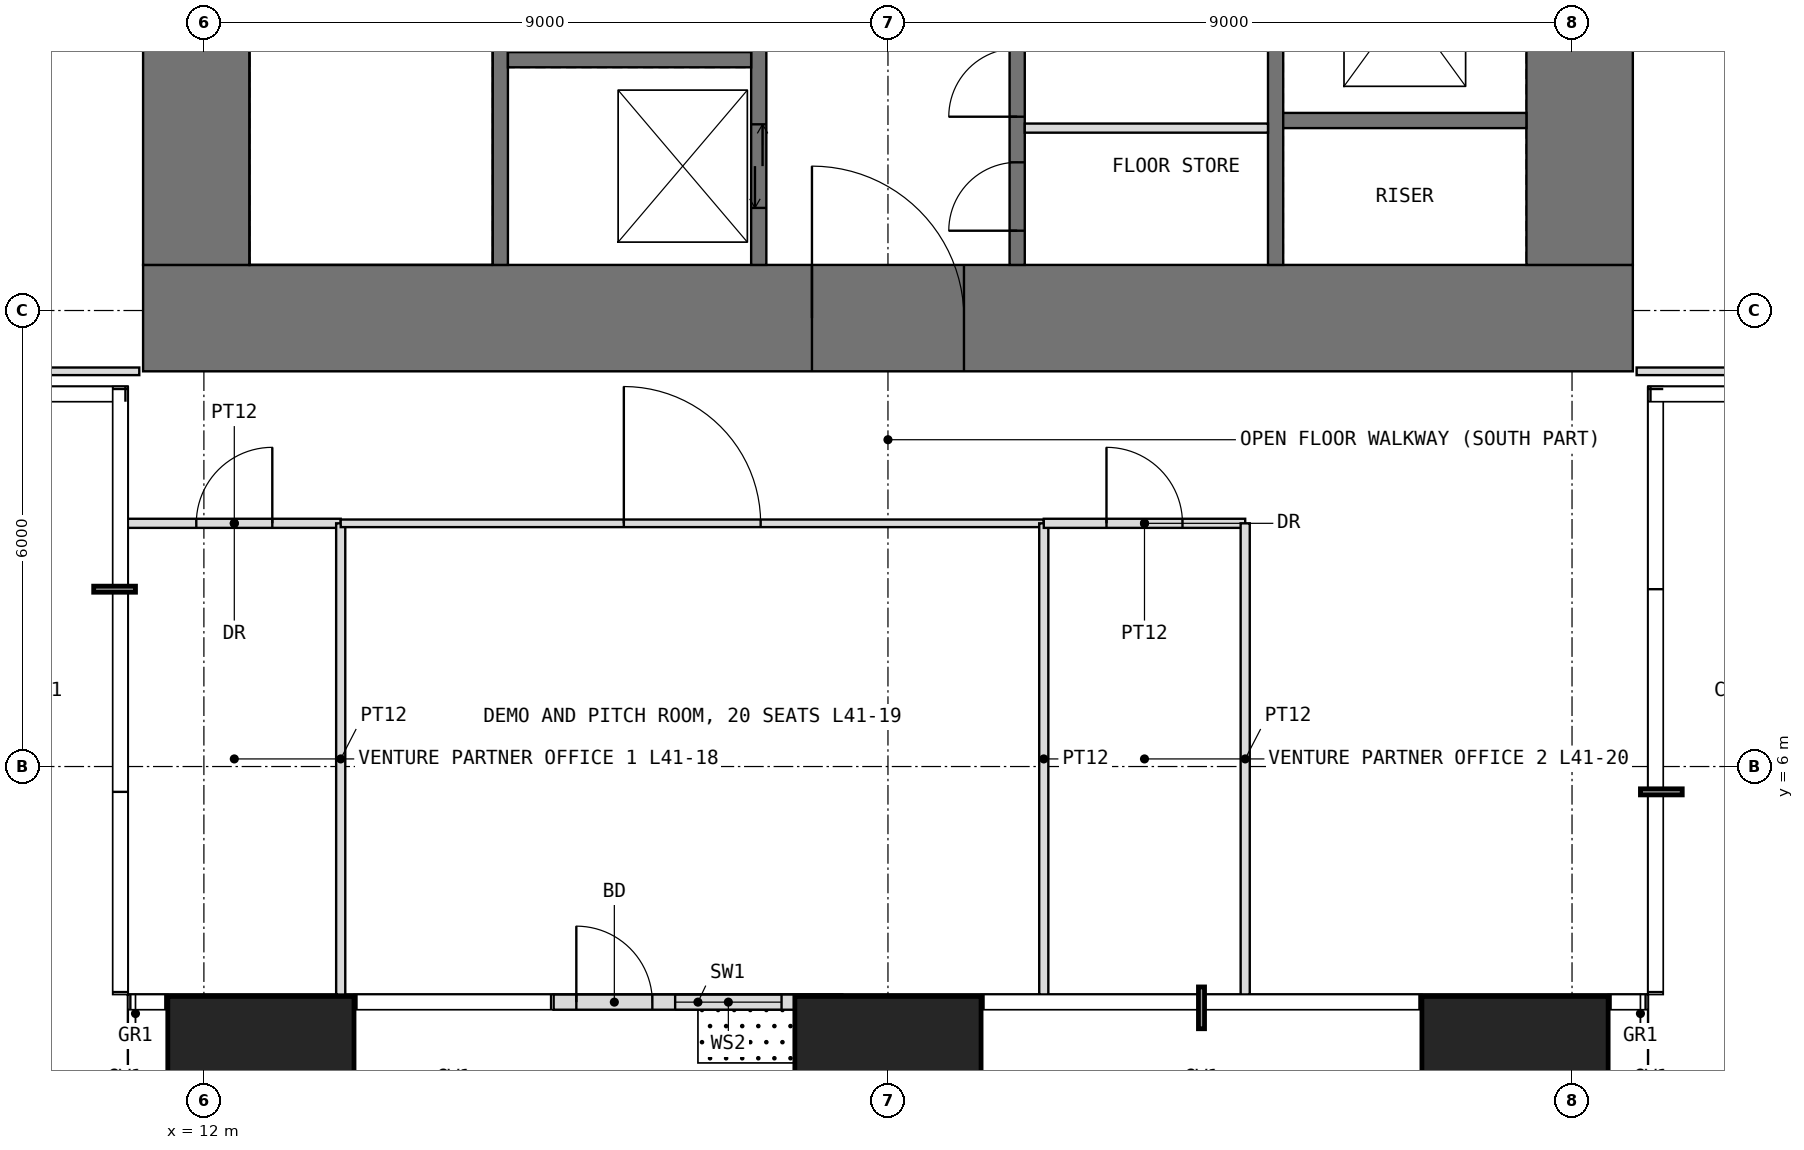
"""IFC4 building model, lengths in metres.
Left out: names, types, materials, properties, quantities, classifications, styles, units other than length and angle.
Written with IfcOpenShell. Run it as: python <this file> out.ifc"""

import sys

from ifc_helpers import new_model, si_unit, direction, frame, frame_2d, origin, origin_2d, place, context, subcontext, project, spatial, rectangle, extrude, element, fill, save


model = new_model("IFC4")
c1 = context("Model", 3, precision=1e-05, world=origin(), true_north=direction((0.0, 1.0)))
c2 = subcontext(c1, "Body", "Model", "MODEL_VIEW")
j1 = project(units=[si_unit("LENGTHUNIT", "METRE"), si_unit("PLANEANGLEUNIT", "RADIAN")], contexts=[c1])
p1 = place(None, origin())
s1 = spatial("IfcSite", under=j1, at=p1, CompositionType="ELEMENT")
p2 = place(p1, origin())
s2 = spatial("IfcBuilding", under=s1, at=p2, CompositionType="ELEMENT")
p3 = place(p2, frame((0.0, 0.0, 174.5)))
s3 = spatial("IfcBuildingStorey", under=s2, at=p3, CompositionType="ELEMENT", Elevation=174.5)
for number, where, z_axis, x_axis in (
    (1, (12.75, 1.75, 0.0), (0.0, 0.0, 1.0), (1.0, 0.0, 0.0)),
    (2, (21.0, 1.75, 0.0), (0.0, 0.0, 1.0), (1.0, 0.0, 0.0)),
    (3, (29.25, 1.75, 0.0), (0.0, 0.0, 1.0), (1.0, 0.0, 0.0)),
):
    element("IfcColumn", number, at=place(p3, frame(where, z_axis=z_axis, x_axis=x_axis)), inside=s3, PredefinedType="COLUMN", context=c2, shape_type="SweptSolid", body=[
        extrude(rectangle(XDim=2.45, YDim=2.45, at=origin_2d()), origin(), (0.0, 0.0, 1.0), 4.0),
    ])
p4 = place(p3, frame((16.6, 2.9, 0.0), z_axis=(0.0, 0.0, 1.0), x_axis=(1.0, 0.0, 0.0)))
e4 = element("IfcWall", 4, at=p4, inside=s3, PredefinedType="USERDEFINED", context=c2, shape_type="SweptSolid", body=[
    extrude(rectangle(XDim=3.8, YDim=0.2, at=frame_2d((1.9, 0.0))), origin(), (0.0, 0.0, 1.0), 3.75),
])
p5 = place(p4, frame((0.3, 0.0, 0.0)))
e5 = element("IfcOpeningElement", 5, at=p5, cuts=e4, PredefinedType="OPENING", context=c2, shape_type="SweptSolid", body=[
    extrude(rectangle(XDim=1.0, YDim=2.4, at=frame_2d((0.5, 1.2))), frame((0.0, 0.11, 0.0), z_axis=(0.0, -1.0, 0.0), x_axis=(1.0, 0.0, 0.0)), (0.0, 0.0, 1.0), 0.22),
])
p6 = place(p4, frame((1.6, 0.0, 0.3)))
e6 = element("IfcOpeningElement", 6, at=p6, cuts=e4, PredefinedType="OPENING", context=c2, shape_type="SweptSolid", body=[
    extrude(rectangle(XDim=1.4, YDim=2.7, at=frame_2d((0.7, 1.35))), frame((0.0, 0.11, 0.0), z_axis=(0.0, -1.0, 0.0), x_axis=(1.0, 0.0, 0.0)), (0.0, 0.0, 1.0), 0.22),
])
p7 = place(p3, frame((11.2, 11.9, -0.05), z_axis=(0.0, 0.0, 1.0), x_axis=(1.0, 0.0, 0.0)))
e7 = element("IfcWall", 7, at=p7, inside=s3, PredefinedType="SHEAR", context=c2, shape_type="SweptSolid", body=[
    extrude(rectangle(XDim=19.6, YDim=1.4, at=frame_2d((9.8, 0.0))), origin(), (0.0, 0.0, 1.0), 4.0),
])
p8 = place(p7, frame((8.8, 0.0, 0.05)))
e8 = element("IfcOpeningElement", 8, at=p8, cuts=e7, PredefinedType="OPENING", context=c2, shape_type="SweptSolid", body=[
    extrude(rectangle(XDim=2.0, YDim=2.2, at=frame_2d((1.0, 1.1))), frame((0.0, 0.71, 0.0), z_axis=(0.0, -1.0, 0.0), x_axis=(1.0, 0.0, 0.0)), (0.0, 0.0, 1.0), 1.42),
])
p9 = place(p3, frame((11.9, 12.6, -0.05), z_axis=(0.0, 0.0, 1.0), x_axis=(0.0, 1.0, 0.0)))
e9 = element("IfcWall", 9, at=p9, inside=s3, PredefinedType="SHEAR", context=c2, shape_type="SweptSolid", body=[
    extrude(rectangle(XDim=16.8, YDim=1.4, at=frame_2d((8.4, 0.0))), origin(), (0.0, 0.0, 1.0), 4.0),
])
p10 = place(p9, frame((9.9, 0.0, 0.05)))
e10 = element("IfcOpeningElement", 10, at=p10, cuts=e9, PredefinedType="OPENING", context=c2, shape_type="SweptSolid", body=[
    extrude(rectangle(XDim=1.0, YDim=2.2, at=frame_2d((0.5, 1.1))), frame((0.0, 0.71, 0.0), z_axis=(0.0, -1.0, 0.0), x_axis=(1.0, 0.0, 0.0)), (0.0, 0.0, 1.0), 1.42),
])
p11 = place(p3, frame((30.1, 12.6, -0.05), z_axis=(0.0, 0.0, 1.0), x_axis=(0.0, 1.0, 0.0)))
e11 = element("IfcWall", 11, at=p11, inside=s3, PredefinedType="SHEAR", context=c2, shape_type="SweptSolid", body=[
    extrude(rectangle(XDim=16.8, YDim=1.4, at=frame_2d((8.4, 0.0))), origin(), (0.0, 0.0, 1.0), 4.0),
])
p12 = place(p11, frame((5.9, 0.0, 0.05)))
e12 = element("IfcOpeningElement", 12, at=p12, cuts=e11, PredefinedType="OPENING", context=c2, shape_type="SweptSolid", body=[
    extrude(rectangle(XDim=1.0, YDim=2.2, at=frame_2d((0.5, 1.1))), frame((0.0, 0.71, 0.0), z_axis=(0.0, -1.0, 0.0), x_axis=(1.0, 0.0, 0.0)), (0.0, 0.0, 1.0), 1.42),
])
p13 = place(p3, frame((15.9, 12.6, -0.05), z_axis=(0.0, 0.0, 1.0), x_axis=(0.0, 1.0, 0.0)))
e13 = element("IfcWall", 13, at=p13, inside=s3, PredefinedType="SHEAR", context=c2, shape_type="SweptSolid", body=[
    extrude(rectangle(XDim=16.8, YDim=0.2, at=frame_2d((8.4, 0.0))), origin(), (0.0, 0.0, 1.0), 4.0),
])
p14 = place(p13, frame((8.9, 0.0, 0.05)))
e14 = element("IfcOpeningElement", 14, at=p14, cuts=e13, PredefinedType="OPENING", context=c2, shape_type="SweptSolid", body=[
    extrude(rectangle(XDim=1.0, YDim=2.2, at=frame_2d((0.5, 1.1))), frame((0.0, 0.11, 0.0), z_axis=(0.0, -1.0, 0.0), x_axis=(1.0, 0.0, 0.0)), (0.0, 0.0, 1.0), 0.22),
])
p15 = place(p3, frame((19.3, 12.6, -0.05), z_axis=(0.0, 0.0, 1.0), x_axis=(0.0, 1.0, 0.0)))
e15 = element("IfcWall", 15, at=p15, inside=s3, PredefinedType="SHEAR", context=c2, shape_type="SweptSolid", body=[
    extrude(rectangle(XDim=16.8, YDim=0.2, at=frame_2d((8.4, 0.0))), origin(), (0.0, 0.0, 1.0), 4.0),
])
p16 = place(p15, frame((8.7, 0.0, 0.05)))
e16 = element("IfcOpeningElement", 16, at=p16, cuts=e15, PredefinedType="OPENING", context=c2, shape_type="SweptSolid", body=[
    extrude(rectangle(XDim=1.0, YDim=2.2, at=frame_2d((0.5, 1.1))), frame((0.0, 0.11, 0.0), z_axis=(0.0, -1.0, 0.0), x_axis=(1.0, 0.0, 0.0)), (0.0, 0.0, 1.0), 0.22),
])
p17 = place(p15, frame((10.85, 0.0, 0.05)))
e17 = element("IfcOpeningElement", 17, at=p17, cuts=e15, PredefinedType="OPENING", context=c2, shape_type="SweptSolid", body=[
    extrude(rectangle(XDim=0.9, YDim=2.2, at=frame_2d((0.45, 1.1))), frame((0.0, 0.11, 0.0), z_axis=(0.0, -1.0, 0.0), x_axis=(1.0, 0.0, 0.0)), (0.0, 0.0, 1.0), 0.22),
])
p18 = place(p15, frame((13.3, 0.0, 0.05)))
e18 = element("IfcOpeningElement", 18, at=p18, cuts=e15, PredefinedType="OPENING", context=c2, shape_type="SweptSolid", body=[
    extrude(rectangle(XDim=1.0, YDim=2.2, at=frame_2d((0.5, 1.1))), frame((0.0, 0.11, 0.0), z_axis=(0.0, -1.0, 0.0), x_axis=(1.0, 0.0, 0.0)), (0.0, 0.0, 1.0), 0.22),
])
p19 = place(p15, frame((15.55, 0.0, 0.05)))
e19 = element("IfcOpeningElement", 19, at=p19, cuts=e15, PredefinedType="OPENING", context=c2, shape_type="SweptSolid", body=[
    extrude(rectangle(XDim=0.9, YDim=2.2, at=frame_2d((0.45, 1.1))), frame((0.0, 0.11, 0.0), z_axis=(0.0, -1.0, 0.0), x_axis=(1.0, 0.0, 0.0)), (0.0, 0.0, 1.0), 0.22),
])
p20 = place(p15, frame((0.75, 0.0, 0.05)))
e20 = element("IfcOpeningElement", 20, at=p20, cuts=e15, PredefinedType="OPENING", context=c2, shape_type="SweptSolid", body=[
    extrude(rectangle(XDim=1.1, YDim=2.2, at=frame_2d((0.55, 1.1))), frame((0.0, 0.11, 0.0), z_axis=(0.0, -1.0, 0.0), x_axis=(1.0, 0.0, 0.0)), (0.0, 0.0, 1.0), 0.22),
])
p21 = place(p15, frame((3.55, 0.0, 0.05)))
e21 = element("IfcOpeningElement", 21, at=p21, cuts=e15, PredefinedType="OPENING", context=c2, shape_type="SweptSolid", body=[
    extrude(rectangle(XDim=1.1, YDim=2.2, at=frame_2d((0.55, 1.1))), frame((0.0, 0.11, 0.0), z_axis=(0.0, -1.0, 0.0), x_axis=(1.0, 0.0, 0.0)), (0.0, 0.0, 1.0), 0.22),
])
p22 = place(p15, frame((6.35, 0.0, 0.05)))
e22 = element("IfcOpeningElement", 22, at=p22, cuts=e15, PredefinedType="OPENING", context=c2, shape_type="SweptSolid", body=[
    extrude(rectangle(XDim=1.1, YDim=2.2, at=frame_2d((0.55, 1.1))), frame((0.0, 0.11, 0.0), z_axis=(0.0, -1.0, 0.0), x_axis=(1.0, 0.0, 0.0)), (0.0, 0.0, 1.0), 0.22),
])
p23 = place(p3, frame((22.7, 12.6, -0.05), z_axis=(0.0, 0.0, 1.0), x_axis=(0.0, 1.0, 0.0)))
e23 = element("IfcWall", 23, at=p23, inside=s3, PredefinedType="SHEAR", context=c2, shape_type="SweptSolid", body=[
    extrude(rectangle(XDim=16.8, YDim=0.2, at=frame_2d((8.4, 0.0))), origin(), (0.0, 0.0, 1.0), 4.0),
])
p24 = place(p23, frame((0.45, 0.0, 0.05)))
e24 = element("IfcOpeningElement", 24, at=p24, cuts=e23, PredefinedType="OPENING", context=c2, shape_type="SweptSolid", body=[
    extrude(rectangle(XDim=0.9, YDim=2.2, at=frame_2d((0.45, 1.1))), frame((0.0, 0.11, 0.0), z_axis=(0.0, -1.0, 0.0), x_axis=(1.0, 0.0, 0.0)), (0.0, 0.0, 1.0), 0.22),
])
p25 = place(p23, frame((7.1, 0.0, 0.05)))
e25 = element("IfcOpeningElement", 25, at=p25, cuts=e23, PredefinedType="OPENING", context=c2, shape_type="SweptSolid", body=[
    extrude(rectangle(XDim=1.0, YDim=2.2, at=frame_2d((0.5, 1.1))), frame((0.0, 0.11, 0.0), z_axis=(0.0, -1.0, 0.0), x_axis=(1.0, 0.0, 0.0)), (0.0, 0.0, 1.0), 0.22),
])
p26 = place(p23, frame((1.95, 0.0, 0.05)))
e26 = element("IfcOpeningElement", 26, at=p26, cuts=e23, PredefinedType="OPENING", context=c2, shape_type="SweptSolid", body=[
    extrude(rectangle(XDim=0.9, YDim=2.2, at=frame_2d((0.45, 1.1))), frame((0.0, 0.11, 0.0), z_axis=(0.0, -1.0, 0.0), x_axis=(1.0, 0.0, 0.0)), (0.0, 0.0, 1.0), 0.22),
])
p27 = place(p23, frame((4.95, 0.0, 0.05)))
e27 = element("IfcOpeningElement", 27, at=p27, cuts=e23, PredefinedType="OPENING", context=c2, shape_type="SweptSolid", body=[
    extrude(rectangle(XDim=0.9, YDim=2.2, at=frame_2d((0.45, 1.1))), frame((0.0, 0.11, 0.0), z_axis=(0.0, -1.0, 0.0), x_axis=(1.0, 0.0, 0.0)), (0.0, 0.0, 1.0), 0.22),
])
p28 = place(p23, frame((9.4, 0.0, 0.05)))
e28 = element("IfcOpeningElement", 28, at=p28, cuts=e23, PredefinedType="OPENING", context=c2, shape_type="SweptSolid", body=[
    extrude(rectangle(XDim=1.0, YDim=2.2, at=frame_2d((0.5, 1.1))), frame((0.0, 0.11, 0.0), z_axis=(0.0, -1.0, 0.0), x_axis=(1.0, 0.0, 0.0)), (0.0, 0.0, 1.0), 0.22),
])
p29 = place(p23, frame((12.2, 0.0, 0.05)))
e29 = element("IfcOpeningElement", 29, at=p29, cuts=e23, PredefinedType="OPENING", context=c2, shape_type="SweptSolid", body=[
    extrude(rectangle(XDim=1.0, YDim=2.2, at=frame_2d((0.5, 1.1))), frame((0.0, 0.11, 0.0), z_axis=(0.0, -1.0, 0.0), x_axis=(1.0, 0.0, 0.0)), (0.0, 0.0, 1.0), 0.22),
])
p30 = place(p3, frame((26.1, 12.6, -0.05), z_axis=(0.0, 0.0, 1.0), x_axis=(0.0, 1.0, 0.0)))
e30 = element("IfcWall", 30, at=p30, inside=s3, PredefinedType="SHEAR", context=c2, shape_type="SweptSolid", body=[
    extrude(rectangle(XDim=16.8, YDim=0.2, at=frame_2d((8.4, 0.0))), origin(), (0.0, 0.0, 1.0), 4.0),
])
p31 = place(p30, frame((6.9, 0.0, 0.05)))
e31 = element("IfcOpeningElement", 31, at=p31, cuts=e30, PredefinedType="OPENING", context=c2, shape_type="SweptSolid", body=[
    extrude(rectangle(XDim=1.0, YDim=2.2, at=frame_2d((0.5, 1.1))), frame((0.0, 0.11, 0.0), z_axis=(0.0, -1.0, 0.0), x_axis=(1.0, 0.0, 0.0)), (0.0, 0.0, 1.0), 0.22),
])
for number, where, z_axis, x_axis in (
    (32, (16.0, 15.3, -0.05), (0.0, 0.0, 1.0), (1.0, 0.0, 0.0)),
    (33, (26.2, 14.5, -0.05), (0.0, 0.0, 1.0), (1.0, 0.0, 0.0)),
):
    element("IfcWall", number, at=place(p3, frame(where, z_axis=z_axis, x_axis=x_axis)), inside=s3, PredefinedType="SHEAR", context=c2, shape_type="SweptSolid", body=[
        extrude(rectangle(XDim=3.2, YDim=0.2, at=frame_2d((1.6, 0.0))), origin(), (0.0, 0.0, 1.0), 4.0),
    ])
p32 = place(p3, frame((22.8, 14.4, 0.0), z_axis=(0.0, 0.0, 1.0), x_axis=(1.0, 0.0, 0.0)))
e34 = element("IfcWall", 34, at=p32, inside=s3, PredefinedType="PARTITIONING", context=c2, shape_type="SweptSolid", body=[
    extrude(rectangle(XDim=3.2, YDim=0.12, at=frame_2d((1.6, 0.0))), origin(), (0.0, 0.0, 1.0), 3.75),
])
p33 = place(p3, frame((7.4, 11.2, 0.0), z_axis=(0.0, 0.0, 1.0), x_axis=(1.0, 0.0, 0.0)))
e35 = element("IfcWall", 35, at=p33, inside=s3, PredefinedType="PARTITIONING", context=c2, shape_type="SweptSolid", body=[
    extrude(rectangle(XDim=3.75, YDim=0.1, at=frame_2d((1.875, 0.0))), origin(), (0.0, 0.0, 1.0), 3.75),
])
p34 = place(p3, frame((11.0, 9.2, 0.0), z_axis=(0.0, 0.0, 1.0), x_axis=(1.0, 0.0, 0.0)))
e36 = element("IfcWall", 36, at=p34, inside=s3, PredefinedType="PARTITIONING", context=c2, shape_type="SweptSolid", body=[
    extrude(rectangle(XDim=2.8, YDim=0.12, at=frame_2d((1.4, 0.0))), origin(), (0.0, 0.0, 1.0), 3.75),
])
p35 = place(p34, frame((0.9, 0.0, 0.0)))
e37 = element("IfcOpeningElement", 37, at=p35, cuts=e36, PredefinedType="OPENING", context=c2, shape_type="SweptSolid", body=[
    extrude(rectangle(XDim=1.0, YDim=2.2, at=frame_2d((0.5, 1.1))), frame((0.0, 0.07, 0.0), z_axis=(0.0, -1.0, 0.0), x_axis=(1.0, 0.0, 0.0)), (0.0, 0.0, 1.0), 0.14),
])
p36 = place(p3, frame((13.8, 3.0, 0.0), z_axis=(0.0, 0.0, 1.0), x_axis=(0.0, 1.0, 0.0)))
e38 = element("IfcWall", 38, at=p36, inside=s3, PredefinedType="PARTITIONING", context=c2, shape_type="SweptSolid", body=[
    extrude(rectangle(XDim=6.2, YDim=0.12, at=frame_2d((3.1, 0.0))), origin(), (0.0, 0.0, 1.0), 3.75),
])
p37 = place(p3, frame((13.8, 9.2, 0.0), z_axis=(0.0, 0.0, 1.0), x_axis=(1.0, 0.0, 0.0)))
e39 = element("IfcWall", 39, at=p37, inside=s3, PredefinedType="PARTITIONING", context=c2, shape_type="SweptSolid", body=[
    extrude(rectangle(XDim=9.25, YDim=0.1, at=frame_2d((4.625, 0.0))), origin(), (0.0, 0.0, 1.0), 3.75),
])
p38 = place(p37, frame((3.725, 0.0, 0.0)))
e40 = element("IfcOpeningElement", 40, at=p38, cuts=e39, PredefinedType="OPENING", context=c2, shape_type="SweptSolid", body=[
    extrude(rectangle(XDim=1.8, YDim=2.4, at=frame_2d((0.9, 1.2))), frame((0.0, 0.06, 0.0), z_axis=(0.0, -1.0, 0.0), x_axis=(1.0, 0.0, 0.0)), (0.0, 0.0, 1.0), 0.12),
])
p39 = place(p3, frame((23.05, 3.0, 0.0), z_axis=(0.0, 0.0, 1.0), x_axis=(0.0, 1.0, 0.0)))
e41 = element("IfcWall", 41, at=p39, inside=s3, PredefinedType="PARTITIONING", context=c2, shape_type="SweptSolid", body=[
    extrude(rectangle(XDim=6.2, YDim=0.12, at=frame_2d((3.1, 0.0))), origin(), (0.0, 0.0, 1.0), 3.75),
])
p40 = place(p3, frame((23.05, 9.2, 0.0), z_axis=(0.0, 0.0, 1.0), x_axis=(1.0, 0.0, 0.0)))
e42 = element("IfcWall", 42, at=p40, inside=s3, PredefinedType="PARTITIONING", context=c2, shape_type="SweptSolid", body=[
    extrude(rectangle(XDim=2.65, YDim=0.12, at=frame_2d((1.325, 0.0))), origin(), (0.0, 0.0, 1.0), 3.75),
])
p41 = place(p40, frame((0.825, 0.0, 0.0)))
e43 = element("IfcOpeningElement", 43, at=p41, cuts=e42, PredefinedType="OPENING", context=c2, shape_type="SweptSolid", body=[
    extrude(rectangle(XDim=1.0, YDim=2.2, at=frame_2d((0.5, 1.1))), frame((0.0, 0.07, 0.0), z_axis=(0.0, -1.0, 0.0), x_axis=(1.0, 0.0, 0.0)), (0.0, 0.0, 1.0), 0.14),
])
p42 = place(p3, frame((25.7, 3.0, 0.0), z_axis=(0.0, 0.0, 1.0), x_axis=(0.0, 1.0, 0.0)))
e44 = element("IfcWall", 44, at=p42, inside=s3, PredefinedType="PARTITIONING", context=c2, shape_type="SweptSolid", body=[
    extrude(rectangle(XDim=6.2, YDim=0.12, at=frame_2d((3.1, 0.0))), origin(), (0.0, 0.0, 1.0), 3.75),
])
p43 = place(p3, frame((30.85, 11.2, 0.0), z_axis=(0.0, 0.0, 1.0), x_axis=(1.0, 0.0, 0.0)))
e45 = element("IfcWall", 45, at=p43, inside=s3, PredefinedType="PARTITIONING", context=c2, shape_type="SweptSolid", body=[
    extrude(rectangle(XDim=5.35, YDim=0.1, at=frame_2d((2.675, 0.0))), origin(), (0.0, 0.0, 1.0), 3.75),
])
p44 = place(p5, origin())
e46 = element("IfcDoor", 46, at=p44, inside=s3, OperationType="SINGLE_SWING_LEFT", PredefinedType="DOOR", context=c2, shape_type="SweptSolid", body=[
    extrude(rectangle(XDim=1.0, YDim=2.4, at=frame_2d((0.5, 1.2))), frame((0.0, 0.025, 0.0), z_axis=(0.0, -1.0, 0.0), x_axis=(1.0, 0.0, 0.0)), (0.0, 0.0, 1.0), 0.05),
])
fill(e5, e46)
p45 = place(p6, origin())
e47 = element("IfcWindow", 47, at=p45, inside=s3, PartitioningType="SINGLE_PANEL", PredefinedType="WINDOW", context=c2, shape_type="SweptSolid", body=[
    extrude(rectangle(XDim=1.4, YDim=2.7, at=frame_2d((0.7, 1.35))), frame((0.0, 0.03, 0.0), z_axis=(0.0, -1.0, 0.0), x_axis=(1.0, 0.0, 0.0)), (0.0, 0.0, 1.0), 0.06),
])
fill(e6, e47)
p46 = place(p8, origin())
e48 = element("IfcDoor", 48, at=p46, inside=s3, OperationType="DOUBLE_DOOR_SINGLE_SWING", PredefinedType="DOOR", context=c2, shape_type="SweptSolid", body=[
    extrude(rectangle(XDim=2.0, YDim=2.2, at=frame_2d((1.0, 1.1))), frame((0.0, 0.025, 0.0), z_axis=(0.0, -1.0, 0.0), x_axis=(1.0, 0.0, 0.0)), (0.0, 0.0, 1.0), 0.05),
])
fill(e8, e48)
p47 = place(p24, origin())
e49 = element("IfcDoor", 49, at=p47, inside=s3, OperationType="SINGLE_SWING_LEFT", PredefinedType="DOOR", context=c2, shape_type="SweptSolid", body=[
    extrude(rectangle(XDim=0.9, YDim=2.2, at=frame_2d((0.45, 1.1))), frame((0.0, 0.025, 0.0), z_axis=(0.0, -1.0, 0.0), x_axis=(1.0, 0.0, 0.0)), (0.0, 0.0, 1.0), 0.05),
])
fill(e24, e49)
p48 = place(p26, origin())
e50 = element("IfcDoor", 50, at=p48, inside=s3, OperationType="SINGLE_SWING_LEFT", PredefinedType="DOOR", context=c2, shape_type="SweptSolid", body=[
    extrude(rectangle(XDim=0.9, YDim=2.2, at=frame_2d((0.45, 1.1))), frame((0.0, 0.025, 0.0), z_axis=(0.0, -1.0, 0.0), x_axis=(1.0, 0.0, 0.0)), (0.0, 0.0, 1.0), 0.05),
])
fill(e26, e50)
p49 = place(p35, origin())
e51 = element("IfcDoor", 51, at=p49, inside=s3, OperationType="SINGLE_SWING_RIGHT", PredefinedType="DOOR", context=c2, shape_type="SweptSolid", body=[
    extrude(rectangle(XDim=1.0, YDim=2.2, at=frame_2d((0.5, 1.1))), frame((0.0, 0.025, 0.0), z_axis=(0.0, -1.0, 0.0), x_axis=(1.0, 0.0, 0.0)), (0.0, 0.0, 1.0), 0.05),
])
fill(e37, e51)
p50 = place(p38, origin())
e52 = element("IfcDoor", 52, at=p50, inside=s3, OperationType="DOUBLE_DOOR_SINGLE_SWING", PredefinedType="DOOR", context=c2, shape_type="SweptSolid", body=[
    extrude(rectangle(XDim=1.8, YDim=2.4, at=frame_2d((0.9, 1.2))), frame((0.0, 0.025, 0.0), z_axis=(0.0, -1.0, 0.0), x_axis=(1.0, 0.0, 0.0)), (0.0, 0.0, 1.0), 0.05),
])
fill(e40, e52)
p51 = place(p41, origin())
e53 = element("IfcDoor", 53, at=p51, inside=s3, OperationType="SINGLE_SWING_LEFT", PredefinedType="DOOR", context=c2, shape_type="SweptSolid", body=[
    extrude(rectangle(XDim=1.0, YDim=2.2, at=frame_2d((0.5, 1.1))), frame((0.0, 0.025, 0.0), z_axis=(0.0, -1.0, 0.0), x_axis=(1.0, 0.0, 0.0)), (0.0, 0.0, 1.0), 0.05),
])
fill(e43, e53)
p52 = place(p20, origin())
e54 = element("IfcDoor", 54, at=p52, inside=s3, OperationType="DOUBLE_DOOR_SLIDING", PredefinedType="DOOR", context=c2, shape_type="SweptSolid", body=[
    extrude(rectangle(XDim=1.1, YDim=2.2, at=frame_2d((0.55, 1.1))), frame((0.0, 0.025, 0.0), z_axis=(0.0, -1.0, 0.0), x_axis=(1.0, 0.0, 0.0)), (0.0, 0.0, 1.0), 0.05),
])
fill(e20, e54)
save(model, sys.argv[1])
